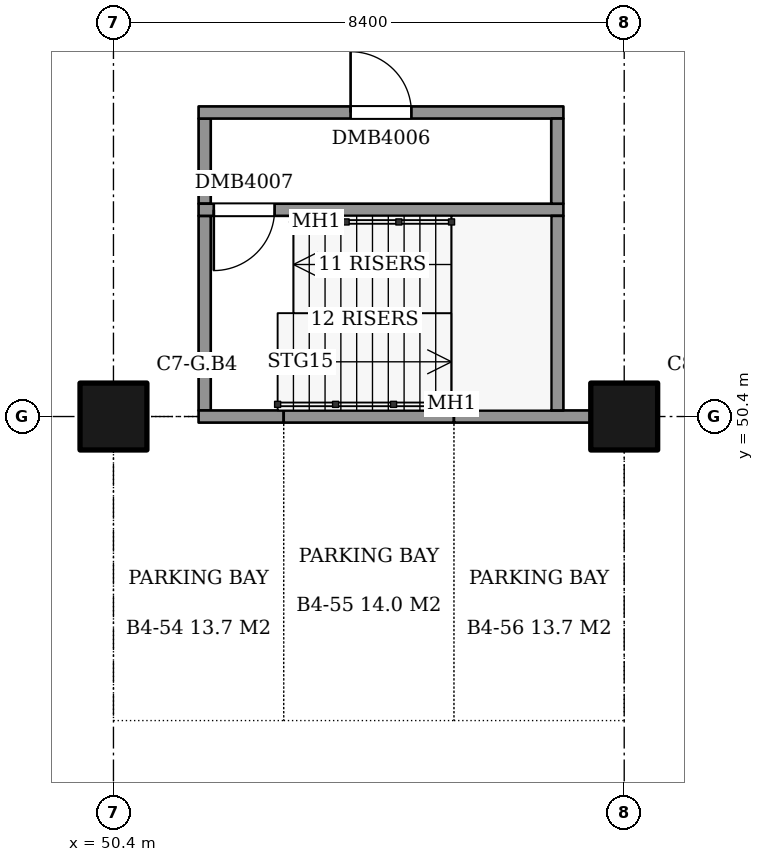
"""IFC4 building model, lengths in metres.
Left out: names, types, materials, properties, quantities, classifications, styles, units other than length and angle.
Written with IfcOpenShell. Run it as: python <this file> out.ifc"""

import sys

from ifc_helpers import new_model, si_unit, direction, frame, frame_2d, origin, origin_2d, place, context, subcontext, project, spatial, rectangle, extrude, element, fill, save


model = new_model("IFC4")
c1 = context("Model", 3, precision=1e-05, world=origin(), true_north=direction((0.0, 1.0)))
c2 = subcontext(c1, "Body", "Model", "MODEL_VIEW")
j1 = project(units=[si_unit("LENGTHUNIT", "METRE"), si_unit("PLANEANGLEUNIT", "RADIAN")], contexts=[c1])
p1 = place(None, origin())
s1 = spatial("IfcSite", under=j1, at=p1, CompositionType="ELEMENT")
p2 = place(p1, origin())
s2 = spatial("IfcBuilding", under=s1, at=p2, CompositionType="ELEMENT")
p3 = place(p2, frame((0.0, 0.0, -16.0)))
s3 = spatial("IfcBuildingStorey", under=s2, at=p3, CompositionType="ELEMENT", Elevation=-16.0)
for number, where, z_axis, x_axis in (
    (1, (50.4, 50.4, 0.0), (0.0, 0.0, 1.0), (1.0, 0.0, 0.0)),
    (2, (58.8, 50.4, 0.0), (0.0, 0.0, 1.0), (1.0, 0.0, 0.0)),
):
    element("IfcColumn", number, at=place(p3, frame(where, z_axis=z_axis, x_axis=x_axis)), inside=s3, PredefinedType="COLUMN", context=c2, shape_type="SweptSolid", body=[
        extrude(rectangle(XDim=1.1, YDim=1.1, at=origin_2d()), origin(), (0.0, 0.0, 1.0), 3.7),
    ])
p4 = place(p3, frame((51.9, 50.5, 0.0), z_axis=(0.0, 0.0, 1.0), x_axis=(0.0, 1.0, 0.0)))
e3 = element("IfcWall", 3, at=p4, inside=s3, PredefinedType="SOLIDWALL", context=c2, shape_type="SweptSolid", body=[
    extrude(rectangle(XDim=3.2, YDim=0.2, at=frame_2d((1.6, 0.0))), origin(), (0.0, 0.0, 1.0), 3.7),
])
p5 = place(p3, frame((51.8, 50.4, 0.0), z_axis=(0.0, 0.0, 1.0), x_axis=(1.0, 0.0, 0.0)))
e4 = element("IfcWall", 4, at=p5, inside=s3, PredefinedType="SOLIDWALL", context=c2, shape_type="SweptSolid", body=[
    extrude(rectangle(XDim=1.4, YDim=0.2, at=frame_2d((0.7, 0.0))), origin(), (0.0, 0.0, 1.0), 3.7),
])
p6 = place(p3, frame((51.9, 53.9, 0.0), z_axis=(0.0, 0.0, 1.0), x_axis=(0.0, 1.0, 0.0)))
e5 = element("IfcWall", 5, at=p6, inside=s3, PredefinedType="SOLIDWALL", context=c2, shape_type="SweptSolid", body=[
    extrude(rectangle(XDim=1.4, YDim=0.2, at=frame_2d((0.7, 0.0))), origin(), (0.0, 0.0, 1.0), 3.7),
])
p7 = place(p3, frame((51.8, 53.8, 0.0), z_axis=(0.0, 0.0, 1.0), x_axis=(1.0, 0.0, 0.0)))
e6 = element("IfcWall", 6, at=p7, inside=s3, PredefinedType="SOLIDWALL", context=c2, shape_type="SweptSolid", body=[
    extrude(rectangle(XDim=6.0, YDim=0.2, at=frame_2d((3.0, 0.0))), origin(), (0.0, 0.0, 1.0), 3.7),
])
p8 = place(p7, frame((0.25, 0.0, 0.0)))
e7 = element("IfcOpeningElement", 7, at=p8, cuts=e6, PredefinedType="OPENING", context=c2, shape_type="SweptSolid", body=[
    extrude(rectangle(XDim=1.0, YDim=2.1, at=frame_2d((0.5, 1.05))), frame((0.0, 0.11, 0.0), z_axis=(0.0, -1.0, 0.0), x_axis=(1.0, 0.0, 0.0)), (0.0, 0.0, 1.0), 0.22),
])
p9 = place(p3, frame((51.8, 55.4, 0.0), z_axis=(0.0, 0.0, 1.0), x_axis=(1.0, 0.0, 0.0)))
e8 = element("IfcWall", 8, at=p9, inside=s3, PredefinedType="SOLIDWALL", context=c2, shape_type="SweptSolid", body=[
    extrude(rectangle(XDim=6.0, YDim=0.2, at=frame_2d((3.0, 0.0))), origin(), (0.0, 0.0, 1.0), 3.7),
])
p10 = place(p9, frame((2.5, 0.0, 0.0)))
e9 = element("IfcOpeningElement", 9, at=p10, cuts=e8, PredefinedType="OPENING", context=c2, shape_type="SweptSolid", body=[
    extrude(rectangle(XDim=1.0, YDim=2.1, at=frame_2d((0.5, 1.05))), frame((0.0, 0.11, 0.0), z_axis=(0.0, -1.0, 0.0), x_axis=(1.0, 0.0, 0.0)), (0.0, 0.0, 1.0), 0.22),
])
p11 = place(p3, frame((53.2, 50.4, 0.0), z_axis=(0.0, 0.0, 1.0), x_axis=(1.0, 0.0, 0.0)))
e10 = element("IfcWall", 10, at=p11, inside=s3, PredefinedType="SOLIDWALL", context=c2, shape_type="SweptSolid", body=[
    extrude(rectangle(XDim=2.8, YDim=0.2, at=frame_2d((1.4, 0.0))), origin(), (0.0, 0.0, 1.0), 3.7),
])
p12 = place(p3, frame((56.0, 50.4, 0.0), z_axis=(0.0, 0.0, 1.0), x_axis=(1.0, 0.0, 0.0)))
e11 = element("IfcWall", 11, at=p12, inside=s3, PredefinedType="SOLIDWALL", context=c2, shape_type="SweptSolid", body=[
    extrude(rectangle(XDim=2.25, YDim=0.2, at=frame_2d((1.125, 0.0))), origin(), (0.0, 0.0, 1.0), 3.7),
])
p13 = place(p3, frame((57.7, 50.5, 0.0), z_axis=(0.0, 0.0, 1.0), x_axis=(0.0, 1.0, 0.0)))
e12 = element("IfcWall", 12, at=p13, inside=s3, PredefinedType="SOLIDWALL", context=c2, shape_type="SweptSolid", body=[
    extrude(rectangle(XDim=3.2, YDim=0.2, at=frame_2d((1.6, 0.0))), origin(), (0.0, 0.0, 1.0), 3.7),
])
p14 = place(p3, frame((57.7, 53.9, 0.0), z_axis=(0.0, 0.0, 1.0), x_axis=(0.0, 1.0, 0.0)))
e13 = element("IfcWall", 13, at=p14, inside=s3, PredefinedType="SOLIDWALL", context=c2, shape_type="SweptSolid", body=[
    extrude(rectangle(XDim=1.4, YDim=0.2, at=frame_2d((0.7, 0.0))), origin(), (0.0, 0.0, 1.0), 3.7),
])
p15 = place(p10, origin())
e14 = element("IfcDoor", 14, at=p15, inside=s3, OperationType="SINGLE_SWING_LEFT", PredefinedType="DOOR", context=c2, shape_type="SweptSolid", body=[
    extrude(rectangle(XDim=1.0, YDim=2.1, at=frame_2d((0.5, 1.05))), frame((0.0, 0.025, 0.0), z_axis=(0.0, -1.0, 0.0), x_axis=(1.0, 0.0, 0.0)), (0.0, 0.0, 1.0), 0.05),
])
fill(e9, e14)
p16 = place(p8, frame((1.0, 0.0, 0.0), z_axis=(0.0, 0.0, 1.0), x_axis=(-1.0, 0.0, 0.0)))
e15 = element("IfcDoor", 15, at=p16, inside=s3, OperationType="SINGLE_SWING_RIGHT", PredefinedType="DOOR", context=c2, shape_type="SweptSolid", body=[
    extrude(rectangle(XDim=1.0, YDim=2.1, at=frame_2d((0.5, 1.05))), frame((0.0, 0.025, 0.0), z_axis=(0.0, -1.0, 0.0), x_axis=(1.0, 0.0, 0.0)), (0.0, 0.0, 1.0), 0.05),
])
fill(e7, e15)
save(model, sys.argv[1])
